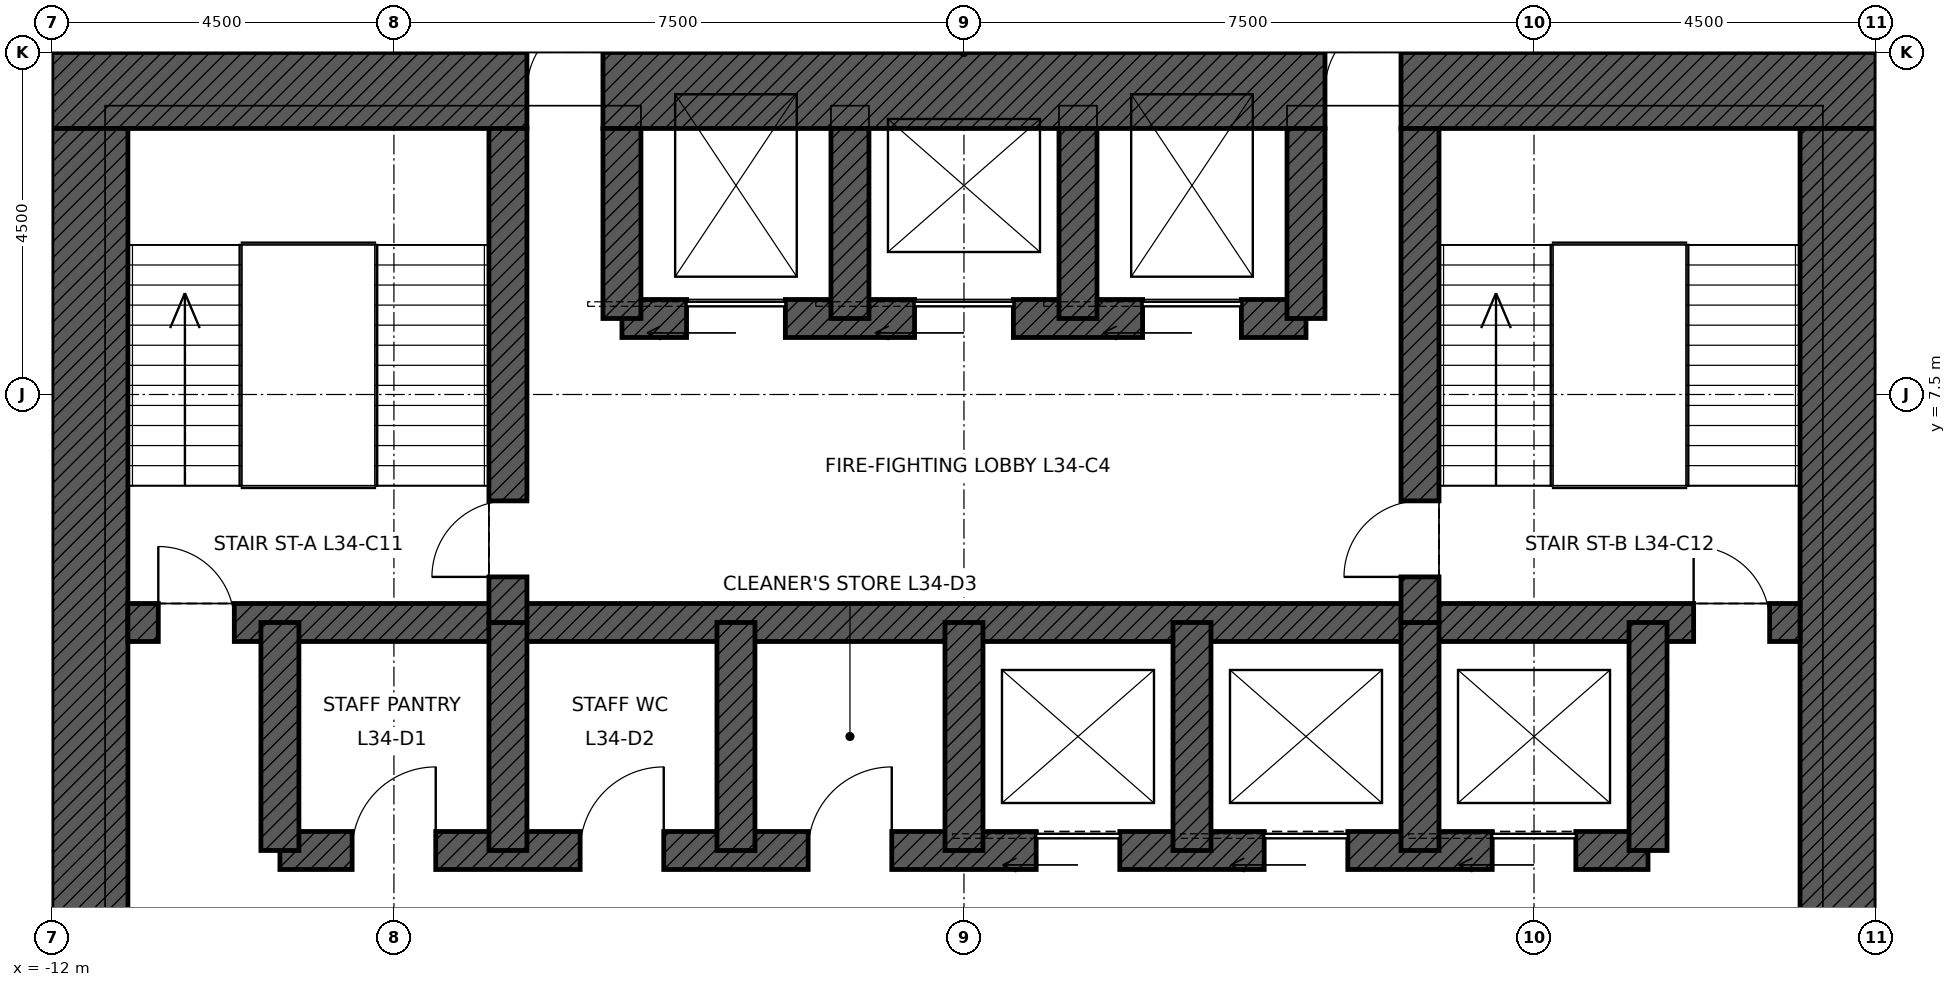
"""IFC4 building model, lengths in metres.
Left out: names, types, materials, properties, quantities, classifications, styles, units other than length and angle.
Written with IfcOpenShell. Run it as: python <this file> out.ifc"""

import sys

from ifc_helpers import new_model, si_unit, direction, frame, frame_2d, origin, place, context, subcontext, project, spatial, rectangle, extrude, element, fill, save


model = new_model("IFC4")
c1 = context("Model", 3, precision=1e-05, world=origin(), true_north=direction((0.0, 1.0)))
c2 = subcontext(c1, "Body", "Model", "MODEL_VIEW")
j1 = project(units=[si_unit("LENGTHUNIT", "METRE"), si_unit("PLANEANGLEUNIT", "RADIAN")], contexts=[c1])
p1 = place(None, origin())
s1 = spatial("IfcSite", under=j1, at=p1, CompositionType="ELEMENT")
p2 = place(p1, origin())
s2 = spatial("IfcBuilding", under=s1, at=p2, CompositionType="ELEMENT")
p3 = place(p2, frame((0.0, 0.0, 167.4)))
s3 = spatial("IfcBuildingStorey", under=s2, at=p3, CompositionType="ELEMENT", Elevation=167.4)
p4 = place(p3, frame((-12.0, 11.5, 0.0), z_axis=(0.0, 0.0, 1.0), x_axis=(1.0, 0.0, 0.0)))
e1 = element("IfcWall", 1, at=p4, inside=s3, PredefinedType="SHEAR", context=c2, shape_type="SweptSolid", body=[
    extrude(rectangle(XDim=24.0, YDim=1.0, at=frame_2d((12.0, 0.0))), origin(), (0.0, 0.0, 1.0), 4.5),
])
p5 = place(p4, frame((6.25, 0.0, 0.0)))
e2 = element("IfcOpeningElement", 2, at=p5, cuts=e1, PredefinedType="OPENING", context=c2, shape_type="SweptSolid", body=[
    extrude(rectangle(XDim=1.0, YDim=2.4, at=frame_2d((0.5, 1.2))), frame((0.0, 0.51, 0.0), z_axis=(0.0, -1.0, 0.0), x_axis=(1.0, 0.0, 0.0)), (0.0, 0.0, 1.0), 1.02),
])
p6 = place(p4, frame((16.75, 0.0, 0.0)))
e3 = element("IfcOpeningElement", 3, at=p6, cuts=e1, PredefinedType="OPENING", context=c2, shape_type="SweptSolid", body=[
    extrude(rectangle(XDim=1.0, YDim=2.4, at=frame_2d((0.5, 1.2))), frame((0.0, 0.51, 0.0), z_axis=(0.0, -1.0, 0.0), x_axis=(1.0, 0.0, 0.0)), (0.0, 0.0, 1.0), 1.02),
])
p7 = place(p3, frame((11.5, 11.0, 0.0), z_axis=(0.0, 0.0, 1.0), x_axis=(0.0, -1.0, 0.0)))
e4 = element("IfcWall", 4, at=p7, inside=s3, PredefinedType="SHEAR", context=c2, shape_type="SweptSolid", body=[
    extrude(rectangle(XDim=22.0, YDim=1.0, at=frame_2d((11.0, 0.0))), origin(), (0.0, 0.0, 1.0), 4.5),
])
p8 = place(p7, frame((10.5, 0.0, 0.0)))
e5 = element("IfcOpeningElement", 5, at=p8, cuts=e4, PredefinedType="OPENING", context=c2, shape_type="SweptSolid", body=[
    extrude(rectangle(XDim=1.0, YDim=2.4, at=frame_2d((0.5, 1.2))), frame((0.0, 0.51, 0.0), z_axis=(0.0, -1.0, 0.0), x_axis=(1.0, 0.0, 0.0)), (0.0, 0.0, 1.0), 1.02),
])
p9 = place(p3, frame((-11.5, -11.0, 0.0), z_axis=(0.0, 0.0, 1.0), x_axis=(0.0, 1.0, 0.0)))
e6 = element("IfcWall", 6, at=p9, inside=s3, PredefinedType="SHEAR", context=c2, shape_type="SweptSolid", body=[
    extrude(rectangle(XDim=22.0, YDim=1.0, at=frame_2d((11.0, 0.0))), origin(), (0.0, 0.0, 1.0), 4.5),
])
p10 = place(p9, frame((10.5, 0.0, 0.0)))
e7 = element("IfcOpeningElement", 7, at=p10, cuts=e6, PredefinedType="OPENING", context=c2, shape_type="SweptSolid", body=[
    extrude(rectangle(XDim=1.0, YDim=2.4, at=frame_2d((0.5, 1.2))), frame((0.0, 0.51, 0.0), z_axis=(0.0, -1.0, 0.0), x_axis=(1.0, 0.0, 0.0)), (0.0, 0.0, 1.0), 1.02),
])
p11 = place(p3, frame((-11.0, 4.5, 0.0), z_axis=(0.0, 0.0, 1.0), x_axis=(1.0, 0.0, 0.0)))
e8 = element("IfcWall", 8, at=p11, inside=s3, PredefinedType="SHEAR", context=c2, shape_type="SweptSolid", body=[
    extrude(rectangle(XDim=22.0, YDim=0.5, at=frame_2d((11.0, 0.0))), origin(), (0.0, 0.0, 1.0), 4.5),
])
p12 = place(p11, frame((0.4, 0.0, 0.0)))
e9 = element("IfcOpeningElement", 9, at=p12, cuts=e8, PredefinedType="OPENING", context=c2, shape_type="SweptSolid", body=[
    extrude(rectangle(XDim=1.0, YDim=2.1, at=frame_2d((0.5, 1.05))), frame((0.0, 0.26, 0.0), z_axis=(0.0, -1.0, 0.0), x_axis=(1.0, 0.0, 0.0)), (0.0, 0.0, 1.0), 0.52),
])
p13 = place(p11, frame((20.6, 0.0, 0.0)))
e10 = element("IfcOpeningElement", 10, at=p13, cuts=e8, PredefinedType="OPENING", context=c2, shape_type="SweptSolid", body=[
    extrude(rectangle(XDim=1.0, YDim=2.1, at=frame_2d((0.5, 1.05))), frame((0.0, 0.26, 0.0), z_axis=(0.0, -1.0, 0.0), x_axis=(1.0, 0.0, 0.0)), (0.0, 0.0, 1.0), 0.52),
])
p14 = place(p3, frame((-9.0, 1.5, 0.0), z_axis=(0.0, 0.0, 1.0), x_axis=(1.0, 0.0, 0.0)))
e11 = element("IfcWall", 11, at=p14, inside=s3, PredefinedType="SHEAR", context=c2, shape_type="SweptSolid", body=[
    extrude(rectangle(XDim=18.0, YDim=0.5, at=frame_2d((9.0, 0.0))), origin(), (0.0, 0.0, 1.0), 4.5),
])
p15 = place(p14, frame((9.95, 0.0, 0.0)))
e12 = element("IfcOpeningElement", 12, at=p15, cuts=e11, PredefinedType="OPENING", context=c2, shape_type="SweptSolid", body=[
    extrude(rectangle(XDim=1.1, YDim=2.1, at=frame_2d((0.55, 1.05))), frame((0.0, 0.26, 0.0), z_axis=(0.0, -1.0, 0.0), x_axis=(1.0, 0.0, 0.0)), (0.0, 0.0, 1.0), 0.52),
])
p16 = place(p14, frame((12.95, 0.0, 0.0)))
e13 = element("IfcOpeningElement", 13, at=p16, cuts=e11, PredefinedType="OPENING", context=c2, shape_type="SweptSolid", body=[
    extrude(rectangle(XDim=1.1, YDim=2.1, at=frame_2d((0.55, 1.05))), frame((0.0, 0.26, 0.0), z_axis=(0.0, -1.0, 0.0), x_axis=(1.0, 0.0, 0.0)), (0.0, 0.0, 1.0), 0.52),
])
p17 = place(p14, frame((15.95, 0.0, 0.0)))
e14 = element("IfcOpeningElement", 14, at=p17, cuts=e11, PredefinedType="OPENING", context=c2, shape_type="SweptSolid", body=[
    extrude(rectangle(XDim=1.1, YDim=2.1, at=frame_2d((0.55, 1.05))), frame((0.0, 0.26, 0.0), z_axis=(0.0, -1.0, 0.0), x_axis=(1.0, 0.0, 0.0)), (0.0, 0.0, 1.0), 0.52),
])
p18 = place(p14, frame((0.95, 0.0, 0.0)))
e15 = element("IfcOpeningElement", 15, at=p18, cuts=e11, PredefinedType="OPENING", context=c2, shape_type="SweptSolid", body=[
    extrude(rectangle(XDim=1.1, YDim=2.1, at=frame_2d((0.55, 1.05))), frame((0.0, 0.26, 0.0), z_axis=(0.0, -1.0, 0.0), x_axis=(1.0, 0.0, 0.0)), (0.0, 0.0, 1.0), 0.52),
])
p19 = place(p14, frame((3.95, 0.0, 0.0)))
e16 = element("IfcOpeningElement", 16, at=p19, cuts=e11, PredefinedType="OPENING", context=c2, shape_type="SweptSolid", body=[
    extrude(rectangle(XDim=1.1, YDim=2.1, at=frame_2d((0.55, 1.05))), frame((0.0, 0.26, 0.0), z_axis=(0.0, -1.0, 0.0), x_axis=(1.0, 0.0, 0.0)), (0.0, 0.0, 1.0), 0.52),
])
p20 = place(p14, frame((6.95, 0.0, 0.0)))
e17 = element("IfcOpeningElement", 17, at=p20, cuts=e11, PredefinedType="OPENING", context=c2, shape_type="SweptSolid", body=[
    extrude(rectangle(XDim=1.1, YDim=2.1, at=frame_2d((0.55, 1.05))), frame((0.0, 0.26, 0.0), z_axis=(0.0, -1.0, 0.0), x_axis=(1.0, 0.0, 0.0)), (0.0, 0.0, 1.0), 0.52),
])
p21 = place(p3, frame((-4.5, 8.5, 0.0), z_axis=(0.0, 0.0, 1.0), x_axis=(1.0, 0.0, 0.0)))
e18 = element("IfcWall", 18, at=p21, inside=s3, PredefinedType="SHEAR", context=c2, shape_type="SweptSolid", body=[
    extrude(rectangle(XDim=9.0, YDim=0.5, at=frame_2d((4.5, 0.0))), origin(), (0.0, 0.0, 1.0), 4.5),
])
p22 = place(p21, frame((0.85, 0.0, 0.0)))
e19 = element("IfcOpeningElement", 19, at=p22, cuts=e18, PredefinedType="OPENING", context=c2, shape_type="SweptSolid", body=[
    extrude(rectangle(XDim=1.3, YDim=2.4, at=frame_2d((0.65, 1.2))), frame((0.0, 0.26, 0.0), z_axis=(0.0, -1.0, 0.0), x_axis=(1.0, 0.0, 0.0)), (0.0, 0.0, 1.0), 0.52),
])
p23 = place(p21, frame((6.85, 0.0, 0.0)))
e20 = element("IfcOpeningElement", 20, at=p23, cuts=e18, PredefinedType="OPENING", context=c2, shape_type="SweptSolid", body=[
    extrude(rectangle(XDim=1.3, YDim=2.4, at=frame_2d((0.65, 1.2))), frame((0.0, 0.26, 0.0), z_axis=(0.0, -1.0, 0.0), x_axis=(1.0, 0.0, 0.0)), (0.0, 0.0, 1.0), 0.52),
])
p24 = place(p21, frame((3.85, 0.0, 0.0)))
e21 = element("IfcOpeningElement", 21, at=p24, cuts=e18, PredefinedType="OPENING", context=c2, shape_type="SweptSolid", body=[
    extrude(rectangle(XDim=1.3, YDim=2.4, at=frame_2d((0.65, 1.2))), frame((0.0, 0.26, 0.0), z_axis=(0.0, -1.0, 0.0), x_axis=(1.0, 0.0, 0.0)), (0.0, 0.0, 1.0), 0.52),
])
for number, where, z_axis, x_axis in (
    (22, (-9.0, 1.5, 0.0), (0.0, 0.0, 1.0), (0.0, 1.0, 0.0)),
    (23, (9.0, 1.5, 0.0), (0.0, 0.0, 1.0), (0.0, 1.0, 0.0)),
    (24, (-6.0, 1.5, 0.0), (0.0, 0.0, 1.0), (0.0, 1.0, 0.0)),
    (25, (-3.0, 1.5, 0.0), (0.0, 0.0, 1.0), (0.0, 1.0, 0.0)),
    (26, (0.0, 1.5, 0.0), (0.0, 0.0, 1.0), (0.0, 1.0, 0.0)),
    (27, (3.0, 1.5, 0.0), (0.0, 0.0, 1.0), (0.0, 1.0, 0.0)),
    (28, (6.0, 1.5, 0.0), (0.0, 0.0, 1.0), (0.0, 1.0, 0.0)),
):
    element("IfcWall", number, at=place(p3, frame(where, z_axis=z_axis, x_axis=x_axis)), inside=s3, PredefinedType="SHEAR", context=c2, shape_type="SweptSolid", body=[
        extrude(rectangle(XDim=3.0, YDim=0.5, at=frame_2d((1.5, 0.0))), origin(), (0.0, 0.0, 1.0), 4.5),
    ])
p25 = place(p3, frame((-6.0, 4.5, 0.0), z_axis=(0.0, 0.0, 1.0), x_axis=(0.0, 1.0, 0.0)))
e29 = element("IfcWall", 29, at=p25, inside=s3, PredefinedType="SHEAR", context=c2, shape_type="SweptSolid", body=[
    extrude(rectangle(XDim=6.5, YDim=0.5, at=frame_2d((3.25, 0.0))), origin(), (0.0, 0.0, 1.0), 4.5),
])
p26 = place(p25, frame((0.6, 0.0, 0.0)))
e30 = element("IfcOpeningElement", 30, at=p26, cuts=e29, PredefinedType="OPENING", context=c2, shape_type="SweptSolid", body=[
    extrude(rectangle(XDim=1.0, YDim=2.1, at=frame_2d((0.5, 1.05))), frame((0.0, 0.26, 0.0), z_axis=(0.0, -1.0, 0.0), x_axis=(1.0, 0.0, 0.0)), (0.0, 0.0, 1.0), 0.52),
])
p27 = place(p3, frame((6.0, 4.5, 0.0), z_axis=(0.0, 0.0, 1.0), x_axis=(0.0, 1.0, 0.0)))
e31 = element("IfcWall", 31, at=p27, inside=s3, PredefinedType="SHEAR", context=c2, shape_type="SweptSolid", body=[
    extrude(rectangle(XDim=6.5, YDim=0.5, at=frame_2d((3.25, 0.0))), origin(), (0.0, 0.0, 1.0), 4.5),
])
p28 = place(p27, frame((0.6, 0.0, 0.0)))
e32 = element("IfcOpeningElement", 32, at=p28, cuts=e31, PredefinedType="OPENING", context=c2, shape_type="SweptSolid", body=[
    extrude(rectangle(XDim=1.0, YDim=2.1, at=frame_2d((0.5, 1.05))), frame((0.0, 0.26, 0.0), z_axis=(0.0, -1.0, 0.0), x_axis=(1.0, 0.0, 0.0)), (0.0, 0.0, 1.0), 0.52),
])
for number, where, z_axis, x_axis in (
    (33, (-4.5, 8.5, 0.0), (0.0, 0.0, 1.0), (0.0, 1.0, 0.0)),
    (34, (4.5, 8.5, 0.0), (0.0, 0.0, 1.0), (0.0, 1.0, 0.0)),
    (35, (-1.5, 8.5, 0.0), (0.0, 0.0, 1.0), (0.0, 1.0, 0.0)),
    (36, (1.5, 8.5, 0.0), (0.0, 0.0, 1.0), (0.0, 1.0, 0.0)),
):
    element("IfcWall", number, at=place(p3, frame(where, z_axis=z_axis, x_axis=x_axis)), inside=s3, PredefinedType="SHEAR", context=c2, shape_type="SweptSolid", body=[
        extrude(rectangle(XDim=2.5, YDim=0.5, at=frame_2d((1.25, 0.0))), origin(), (0.0, 0.0, 1.0), 4.5),
    ])
p29 = place(p12, origin())
e37 = element("IfcDoor", 37, at=p29, inside=s3, OperationType="SINGLE_SWING_LEFT", PredefinedType="DOOR", context=c2, shape_type="SweptSolid", body=[
    extrude(rectangle(XDim=1.0, YDim=2.1, at=frame_2d((0.5, 1.05))), frame((0.0, 0.025, 0.0), z_axis=(0.0, -1.0, 0.0), x_axis=(1.0, 0.0, 0.0)), (0.0, 0.0, 1.0), 0.05),
])
fill(e9, e37)
p30 = place(p13, origin())
e38 = element("IfcDoor", 38, at=p30, inside=s3, OperationType="SINGLE_SWING_LEFT", PredefinedType="DOOR", context=c2, shape_type="SweptSolid", body=[
    extrude(rectangle(XDim=1.0, YDim=2.1, at=frame_2d((0.5, 1.05))), frame((0.0, 0.025, 0.0), z_axis=(0.0, -1.0, 0.0), x_axis=(1.0, 0.0, 0.0)), (0.0, 0.0, 1.0), 0.05),
])
fill(e10, e38)
p31 = place(p26, origin())
e39 = element("IfcDoor", 39, at=p31, inside=s3, OperationType="SINGLE_SWING_LEFT", PredefinedType="DOOR", context=c2, shape_type="SweptSolid", body=[
    extrude(rectangle(XDim=1.0, YDim=2.1, at=frame_2d((0.5, 1.05))), frame((0.0, 0.025, 0.0), z_axis=(0.0, -1.0, 0.0), x_axis=(1.0, 0.0, 0.0)), (0.0, 0.0, 1.0), 0.05),
])
fill(e30, e39)
p32 = place(p28, origin())
e40 = element("IfcDoor", 40, at=p32, inside=s3, OperationType="SINGLE_SWING_LEFT", PredefinedType="DOOR", context=c2, shape_type="SweptSolid", body=[
    extrude(rectangle(XDim=1.0, YDim=2.1, at=frame_2d((0.5, 1.05))), frame((0.0, 0.025, 0.0), z_axis=(0.0, -1.0, 0.0), x_axis=(1.0, 0.0, 0.0)), (0.0, 0.0, 1.0), 0.05),
])
fill(e32, e40)
p33 = place(p5, origin())
e41 = element("IfcDoor", 41, at=p33, inside=s3, OperationType="SINGLE_SWING_RIGHT", PredefinedType="DOOR", context=c2, shape_type="SweptSolid", body=[
    extrude(rectangle(XDim=1.0, YDim=2.4, at=frame_2d((0.5, 1.2))), frame((0.0, 0.485, 0.0), z_axis=(0.0, -1.0, 0.0), x_axis=(1.0, 0.0, 0.0)), (0.0, 0.0, 1.0), 0.05),
])
fill(e2, e41)
p34 = place(p6, origin())
e42 = element("IfcDoor", 42, at=p34, inside=s3, OperationType="SINGLE_SWING_RIGHT", PredefinedType="DOOR", context=c2, shape_type="SweptSolid", body=[
    extrude(rectangle(XDim=1.0, YDim=2.4, at=frame_2d((0.5, 1.2))), frame((0.0, 0.485, 0.0), z_axis=(0.0, -1.0, 0.0), x_axis=(1.0, 0.0, 0.0)), (0.0, 0.0, 1.0), 0.05),
])
fill(e3, e42)
p35 = place(p22, origin())
e43 = element("IfcDoor", 43, at=p35, inside=s3, OperationType="SLIDING_TO_LEFT", PredefinedType="DOOR", context=c2, shape_type="SweptSolid", body=[
    extrude(rectangle(XDim=1.3, YDim=2.4, at=frame_2d((0.65, 1.2))), frame((0.0, 0.025, 0.0), z_axis=(0.0, -1.0, 0.0), x_axis=(1.0, 0.0, 0.0)), (0.0, 0.0, 1.0), 0.05),
])
fill(e19, e43)
p36 = place(p23, origin())
e44 = element("IfcDoor", 44, at=p36, inside=s3, OperationType="SLIDING_TO_LEFT", PredefinedType="DOOR", context=c2, shape_type="SweptSolid", body=[
    extrude(rectangle(XDim=1.3, YDim=2.4, at=frame_2d((0.65, 1.2))), frame((0.0, 0.025, 0.0), z_axis=(0.0, -1.0, 0.0), x_axis=(1.0, 0.0, 0.0)), (0.0, 0.0, 1.0), 0.05),
])
fill(e20, e44)
p37 = place(p24, origin())
e45 = element("IfcDoor", 45, at=p37, inside=s3, OperationType="SLIDING_TO_LEFT", PredefinedType="DOOR", context=c2, shape_type="SweptSolid", body=[
    extrude(rectangle(XDim=1.3, YDim=2.4, at=frame_2d((0.65, 1.2))), frame((0.0, 0.025, 0.0), z_axis=(0.0, -1.0, 0.0), x_axis=(1.0, 0.0, 0.0)), (0.0, 0.0, 1.0), 0.05),
])
fill(e21, e45)
p38 = place(p15, origin())
e46 = element("IfcDoor", 46, at=p38, inside=s3, OperationType="SLIDING_TO_LEFT", PredefinedType="DOOR", context=c2, shape_type="SweptSolid", body=[
    extrude(rectangle(XDim=1.1, YDim=2.1, at=frame_2d((0.55, 1.05))), frame((0.0, 0.025, 0.0), z_axis=(0.0, -1.0, 0.0), x_axis=(1.0, 0.0, 0.0)), (0.0, 0.0, 1.0), 0.05),
])
fill(e12, e46)
p39 = place(p16, origin())
e47 = element("IfcDoor", 47, at=p39, inside=s3, OperationType="SLIDING_TO_LEFT", PredefinedType="DOOR", context=c2, shape_type="SweptSolid", body=[
    extrude(rectangle(XDim=1.1, YDim=2.1, at=frame_2d((0.55, 1.05))), frame((0.0, 0.025, 0.0), z_axis=(0.0, -1.0, 0.0), x_axis=(1.0, 0.0, 0.0)), (0.0, 0.0, 1.0), 0.05),
])
fill(e13, e47)
p40 = place(p17, origin())
e48 = element("IfcDoor", 48, at=p40, inside=s3, OperationType="SLIDING_TO_LEFT", PredefinedType="DOOR", context=c2, shape_type="SweptSolid", body=[
    extrude(rectangle(XDim=1.1, YDim=2.1, at=frame_2d((0.55, 1.05))), frame((0.0, 0.025, 0.0), z_axis=(0.0, -1.0, 0.0), x_axis=(1.0, 0.0, 0.0)), (0.0, 0.0, 1.0), 0.05),
])
fill(e14, e48)
p41 = place(p18, origin())
e49 = element("IfcDoor", 49, at=p41, inside=s3, OperationType="SINGLE_SWING_RIGHT", PredefinedType="DOOR", context=c2, shape_type="SweptSolid", body=[
    extrude(rectangle(XDim=1.1, YDim=2.1, at=frame_2d((0.55, 1.05))), frame((0.0, 0.025, 0.0), z_axis=(0.0, -1.0, 0.0), x_axis=(1.0, 0.0, 0.0)), (0.0, 0.0, 1.0), 0.05),
])
fill(e15, e49)
p42 = place(p19, origin())
e50 = element("IfcDoor", 50, at=p42, inside=s3, OperationType="SINGLE_SWING_RIGHT", PredefinedType="DOOR", context=c2, shape_type="SweptSolid", body=[
    extrude(rectangle(XDim=1.1, YDim=2.1, at=frame_2d((0.55, 1.05))), frame((0.0, 0.025, 0.0), z_axis=(0.0, -1.0, 0.0), x_axis=(1.0, 0.0, 0.0)), (0.0, 0.0, 1.0), 0.05),
])
fill(e16, e50)
p43 = place(p20, origin())
e51 = element("IfcDoor", 51, at=p43, inside=s3, OperationType="SINGLE_SWING_RIGHT", PredefinedType="DOOR", context=c2, shape_type="SweptSolid", body=[
    extrude(rectangle(XDim=1.1, YDim=2.1, at=frame_2d((0.55, 1.05))), frame((0.0, 0.025, 0.0), z_axis=(0.0, -1.0, 0.0), x_axis=(1.0, 0.0, 0.0)), (0.0, 0.0, 1.0), 0.05),
])
fill(e17, e51)
save(model, sys.argv[1])
